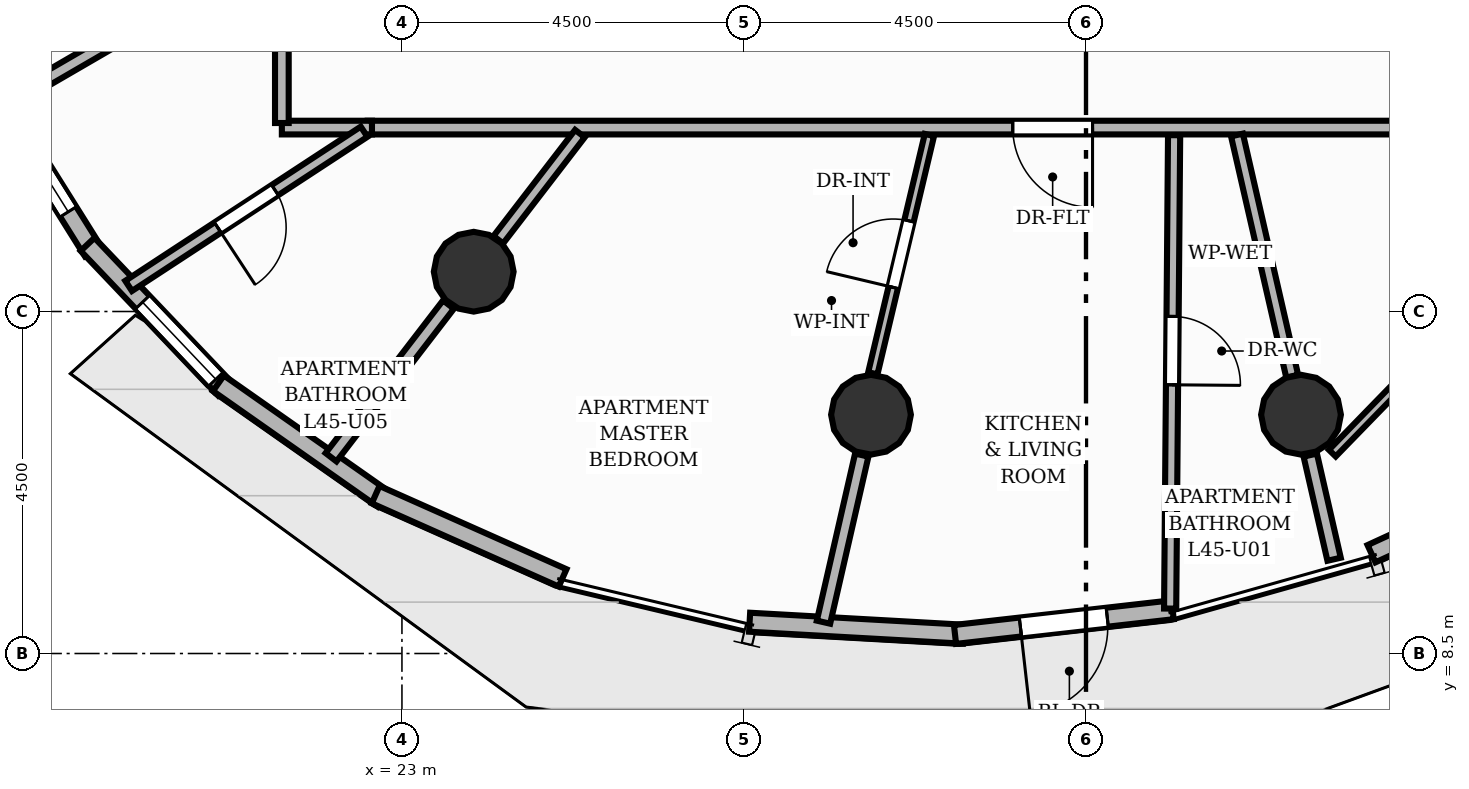
"""IFC4 building model, lengths in metres.
Left out: names, types, materials, properties, quantities, classifications, styles, units other than length and angle.
Written with IfcOpenShell. Run it as: python <this file> out.ifc"""

import sys

from ifc_helpers import new_model, si_unit, direction, frame, frame_2d, origin, origin_2d, place, context, subcontext, project, spatial, rectangle, circle, extrude, element, fill, save


model = new_model("IFC4")
c1 = context("Model", 3, precision=1e-05, world=origin(), true_north=direction((0.0, 1.0)))
c2 = subcontext(c1, "Body", "Model", "MODEL_VIEW")
j1 = project(units=[si_unit("LENGTHUNIT", "METRE"), si_unit("PLANEANGLEUNIT", "RADIAN")], contexts=[c1])
p1 = place(None, origin())
s1 = spatial("IfcSite", under=j1, at=p1, CompositionType="ELEMENT")
p2 = place(p1, origin())
s2 = spatial("IfcBuilding", under=s1, at=p2, CompositionType="ELEMENT")
p3 = place(p2, frame((0.0, 0.0, 152.16)))
s3 = spatial("IfcBuildingStorey", under=s2, at=p3, CompositionType="ELEMENT", Elevation=152.16)
for number, where, z_axis, x_axis in (
    (1, (23.944, 13.523, 0.0), (0.0, 0.0, 1.0), (1.0, 0.0, 0.0)),
    (2, (29.171, 11.642, 0.0), (0.0, 0.0, 1.0), (1.0, 0.0, 0.0)),
    (3, (34.829, 11.642, 0.0), (0.0, 0.0, 1.0), (1.0, 0.0, 0.0)),
):
    element("IfcColumn", number, at=place(p3, frame(where, z_axis=z_axis, x_axis=x_axis)), inside=s3, PredefinedType="COLUMN", context=c2, shape_type="SweptSolid", body=[
        extrude(circle(Radius=0.525, at=origin_2d()), origin(), (0.0, 0.0, 1.0), 3.2),
    ])
p4 = place(p3, frame((18.934, 13.793, 0.0), z_axis=(0.0, 0.0, 1.0), x_axis=(-0.530726374543, 0.847543223302, 0.0)))
e4 = element("IfcWall", 4, at=p4, inside=s3, PredefinedType="SOLIDWALL", context=c2, shape_type="SweptSolid", body=[
    extrude(rectangle(XDim=2.624, YDim=0.25, at=frame_2d((1.312, 0.0))), origin(), (0.0, 0.0, 1.0), 2.96),
])
p5 = place(p4, frame((0.612, 0.0, 0.85)))
e5 = element("IfcOpeningElement", 5, at=p5, cuts=e4, PredefinedType="OPENING", context=c2, shape_type="SweptSolid", body=[
    extrude(rectangle(XDim=1.4, YDim=1.45, at=frame_2d((0.7, 0.725))), frame((0.0, 0.135, 0.0), z_axis=(0.0, -1.0, 0.0), x_axis=(1.0, 0.0, 0.0)), (0.0, 0.0, 1.0), 0.27),
])
p6 = place(p3, frame((20.672, 11.981, 0.0), z_axis=(0.0, 0.0, 1.0), x_axis=(-0.688923042016, 0.724834492957, 0.0)))
e6 = element("IfcWall", 6, at=p6, inside=s3, PredefinedType="SOLIDWALL", context=c2, shape_type="SweptSolid", body=[
    extrude(rectangle(XDim=2.624, YDim=0.25, at=frame_2d((1.312, 0.0))), origin(), (0.0, 0.0, 1.0), 2.96),
])
p7 = place(p6, frame((0.175, 0.0, 0.85)))
e7 = element("IfcOpeningElement", 7, at=p7, cuts=e6, PredefinedType="OPENING", context=c2, shape_type="SweptSolid", body=[
    extrude(rectangle(XDim=1.4, YDim=1.55, at=frame_2d((0.7, 0.775))), frame((0.0, 0.135, 0.0), z_axis=(0.0, -1.0, 0.0), x_axis=(1.0, 0.0, 0.0)), (0.0, 0.0, 1.0), 0.27),
])
p8 = place(p3, frame((22.753, 10.534, 0.0), z_axis=(0.0, 0.0, 1.0), x_axis=(-0.818434239786, 0.574600204617, 0.0)))
e8 = element("IfcWall", 8, at=p8, inside=s3, PredefinedType="SOLIDWALL", context=c2, shape_type="SweptSolid", body=[
    extrude(rectangle(XDim=2.648, YDim=0.25, at=frame_2d((1.324, 0.0))), origin(), (0.0, 0.0, 1.0), 2.96),
])
p9 = place(p3, frame((25.114, 9.495, 0.0), z_axis=(0.0, 0.0, 1.0), x_axis=(-0.913598321014, 0.406617889228, 0.0)))
e9 = element("IfcWall", 9, at=p9, inside=s3, PredefinedType="SOLIDWALL", context=c2, shape_type="SweptSolid", body=[
    extrude(rectangle(XDim=2.693, YDim=0.25, at=frame_2d((1.346, 0.0))), origin(), (0.0, 0.0, 1.0), 2.96),
])
p10 = place(p3, frame((30.387, 8.754, 0.0), z_axis=(0.0, 0.0, 1.0), x_axis=(-0.998436800423, 0.055892356906, 0.0)))
e10 = element("IfcWall", 10, at=p10, inside=s3, PredefinedType="SOLIDWALL", context=c2, shape_type="SweptSolid", body=[
    extrude(rectangle(XDim=2.817, YDim=0.25, at=frame_2d((1.409, 0.0))), origin(), (0.0, 0.0, 1.0), 2.96),
])
p11 = place(p3, frame((33.14, 9.076, 0.0), z_axis=(0.0, 0.0, 1.0), x_axis=(-0.993631150985, -0.112681568111, 0.0)))
e11 = element("IfcWall", 11, at=p11, inside=s3, PredefinedType="SOLIDWALL", context=c2, shape_type="SweptSolid", body=[
    extrude(rectangle(XDim=2.882, YDim=0.25, at=frame_2d((1.441, 0.0))), origin(), (0.0, 0.0, 1.0), 2.96),
])
p12 = place(p11, frame((0.866, 0.0, 0.0)))
e12 = element("IfcOpeningElement", 12, at=p12, cuts=e11, PredefinedType="OPENING", context=c2, shape_type="SweptSolid", body=[
    extrude(rectangle(XDim=1.15, YDim=2.2, at=frame_2d((0.575, 1.1))), frame((0.0, 0.135, 0.0), z_axis=(0.0, -1.0, 0.0), x_axis=(1.0, 0.0, 0.0)), (0.0, 0.0, 1.0), 0.27),
])
p13 = place(p3, frame((38.461, 11.056, 0.0), z_axis=(0.0, 0.0, 1.0), x_axis=(-0.908594420046, -0.417679518124, 0.0)))
e13 = element("IfcWall", 13, at=p13, inside=s3, PredefinedType="SOLIDWALL", context=c2, shape_type="SweptSolid", body=[
    extrude(rectangle(XDim=2.977, YDim=0.25, at=frame_2d((1.489, 0.0))), origin(), (0.0, 0.0, 1.0), 2.96),
])
p14 = place(p13, frame((0.664, 0.0, 0.85)))
e14 = element("IfcOpeningElement", 14, at=p14, cuts=e13, PredefinedType="OPENING", context=c2, shape_type="SweptSolid", body=[
    extrude(rectangle(XDim=1.65, YDim=1.55, at=frame_2d((0.825, 0.775))), frame((0.0, 0.135, 0.0), z_axis=(0.0, -1.0, 0.0), x_axis=(1.0, 0.0, 0.0)), (0.0, 0.0, 1.0), 0.27),
])
p15 = place(p3, frame((19.472, 16.726, 0.0), z_axis=(0.0, 0.0, 1.0), x_axis=(-0.864794183852, -0.502126497584, 0.0)))
e15 = element("IfcWall", 15, at=p15, inside=s3, PredefinedType="PARTITIONING", context=c2, shape_type="SweptSolid", body=[
    extrude(rectangle(XDim=1.959, YDim=0.18, at=frame_2d((0.979, 0.0))), origin(), (0.0, 0.0, 1.0), 2.336),
])
p16 = place(p3, frame((23.612, 13.092, 0.0), z_axis=(0.0, 0.0, 1.0), x_axis=(-0.609529171404, -0.79276364019, 0.0)))
e16 = element("IfcWall", 16, at=p16, inside=s3, PredefinedType="PARTITIONING", context=c2, shape_type="SweptSolid", body=[
    extrude(rectangle(XDim=2.534, YDim=0.18, at=frame_2d((1.267, 0.0))), origin(), (0.0, 0.0, 1.0), 2.336),
])
p17 = place(p3, frame((29.05, 11.111, 0.0), z_axis=(0.0, 0.0, 1.0), x_axis=(-0.223104026265, -0.974794641688, 0.0)))
e17 = element("IfcWall", 17, at=p17, inside=s3, PredefinedType="PARTITIONING", context=c2, shape_type="SweptSolid", body=[
    extrude(rectangle(XDim=2.255, YDim=0.18, at=frame_2d((1.128, 0.0))), origin(), (0.0, 0.0, 1.0), 2.336),
])
p18 = place(p3, frame((34.95, 11.111, 0.0), z_axis=(0.0, 0.0, 1.0), x_axis=(0.223121817242, -0.974790569646, 0.0)))
e18 = element("IfcWall", 18, at=p18, inside=s3, PredefinedType="PARTITIONING", context=c2, shape_type="SweptSolid", body=[
    extrude(rectangle(XDim=1.406, YDim=0.18, at=frame_2d((0.703, 0.0))), origin(), (0.0, 0.0, 1.0), 2.336),
])
p19 = place(p3, frame((39.08, 15.42, 0.0), z_axis=(0.0, 0.0, 1.0), x_axis=(-1.0, 0.0, 0.0)))
e19 = element("IfcWall", 19, at=p19, inside=s3, PredefinedType="PARTITIONING", context=c2, shape_type="SweptSolid", body=[
    extrude(rectangle(XDim=16.531, YDim=0.18, at=frame_2d((8.266, 0.0))), origin(), (0.0, 0.0, 1.0), 2.955),
])
p20 = place(p19, frame((6.994, 0.0, 0.0)))
e20 = element("IfcOpeningElement", 20, at=p20, cuts=e19, PredefinedType="OPENING", context=c2, shape_type="SweptSolid", body=[
    extrude(rectangle(XDim=1.05, YDim=2.15, at=frame_2d((0.525, 1.075))), frame((0.0, 0.1, 0.0), z_axis=(0.0, -1.0, 0.0), x_axis=(1.0, 0.0, 0.0)), (0.0, 0.0, 1.0), 0.2),
])
p21 = place(p3, frame((22.606, 15.42, 0.0), z_axis=(0.0, 0.0, 1.0), x_axis=(-1.0, 0.0, 0.0)))
e21 = element("IfcWall", 21, at=p21, inside=s3, PredefinedType="PARTITIONING", context=c2, shape_type="SweptSolid", body=[
    extrude(rectangle(XDim=1.186, YDim=0.18, at=frame_2d((0.593, 0.0))), origin(), (0.0, 0.0, 1.0), 2.955),
])
p22 = place(p3, frame((21.42, 15.48, 0.0), z_axis=(0.0, 0.0, 1.0), x_axis=(0.0, 1.0, 0.0)))
e22 = element("IfcWall", 22, at=p22, inside=s3, PredefinedType="PARTITIONING", context=c2, shape_type="SweptSolid", body=[
    extrude(rectangle(XDim=6.12, YDim=0.18, at=frame_2d((3.06, 0.0))), origin(), (0.0, 0.0, 1.0), 2.955),
])
p23 = place(p22, frame((2.312, 0.0, 0.0)))
e23 = element("IfcOpeningElement", 23, at=p23, cuts=e22, PredefinedType="OPENING", context=c2, shape_type="SweptSolid", body=[
    extrude(rectangle(XDim=1.05, YDim=2.15, at=frame_2d((0.525, 1.075))), frame((0.0, 0.1, 0.0), z_axis=(0.0, -1.0, 0.0), x_axis=(1.0, 0.0, 0.0)), (0.0, 0.0, 1.0), 0.2),
])
p24 = place(p3, frame((33.159, 15.32, 0.0), z_axis=(0.0, 0.0, 1.0), x_axis=(-0.008387256911, -0.999964826342, 0.0)))
e24 = element("IfcWall", 24, at=p24, inside=s3, PredefinedType="PLUMBINGWALL", context=c2, shape_type="SweptSolid", body=[
    extrude(rectangle(XDim=6.229, YDim=0.16, at=frame_2d((3.115, 0.0))), origin(), (0.0, 0.0, 1.0), 2.955),
])
p25 = place(p24, frame((2.385, 0.0, 0.0)))
e25 = element("IfcOpeningElement", 25, at=p25, cuts=e24, PredefinedType="OPENING", context=c2, shape_type="SweptSolid", body=[
    extrude(rectangle(XDim=0.9, YDim=2.1, at=frame_2d((0.45, 1.05))), frame((0.0, 0.09, 0.0), z_axis=(0.0, -1.0, 0.0), x_axis=(1.0, 0.0, 0.0)), (0.0, 0.0, 1.0), 0.18),
])
p26 = place(p3, frame((29.196, 12.187, 0.0), z_axis=(0.0, 0.0, 1.0), x_axis=(0.230968453673, 0.972961239417, 0.0)))
e26 = element("IfcWall", 26, at=p26, inside=s3, PredefinedType="PARTITIONING", context=c2, shape_type="SweptSolid", body=[
    extrude(rectangle(XDim=3.223, YDim=0.125, at=frame_2d((1.611, 0.0))), origin(), (0.0, 0.0, 1.0), 2.336),
])
p27 = place(p26, frame((1.161, 0.0, 0.0)))
e27 = element("IfcOpeningElement", 27, at=p27, cuts=e26, PredefinedType="OPENING", context=c2, shape_type="SweptSolid", body=[
    extrude(rectangle(XDim=0.9, YDim=2.1, at=frame_2d((0.45, 1.05))), frame((0.0, 0.073, 0.0), z_axis=(0.0, -1.0, 0.0), x_axis=(1.0, 0.0, 0.0)), (0.0, 0.0, 1.0), 0.145),
])
p28 = place(p3, frame((33.986, 15.323, 0.0), z_axis=(0.0, 0.0, 1.0), x_axis=(0.223166862669, -0.97478025801, 0.0)))
e28 = element("IfcWall", 28, at=p28, inside=s3, PredefinedType="PLUMBINGWALL", context=c2, shape_type="SweptSolid", body=[
    extrude(rectangle(XDim=3.256, YDim=0.16, at=frame_2d((1.628, 0.0))), origin(), (0.0, 0.0, 1.0), 2.336),
])
p29 = place(p3, frame((24.268, 13.944, 0.0), z_axis=(0.0, 0.0, 1.0), x_axis=(0.609536601946, 0.792757927042, 0.0)))
e29 = element("IfcWall", 29, at=p29, inside=s3, PredefinedType="PLUMBINGWALL", context=c2, shape_type="SweptSolid", body=[
    extrude(rectangle(XDim=1.761, YDim=0.16, at=frame_2d((0.881, 0.0))), origin(), (0.0, 0.0, 1.0), 2.336),
])
p30 = place(p3, frame((44.336, 20.497, 0.0), z_axis=(0.0, 0.0, 1.0), x_axis=(-0.696857448942, -0.717209659621, 0.0)))
e30 = element("IfcWall", 30, at=p30, inside=s3, PredefinedType="PARTITIONING", context=c2, shape_type="SweptSolid", body=[
    extrude(rectangle(XDim=13.052, YDim=0.125, at=frame_2d((6.526, 0.0))), origin(), (0.0, 0.0, 1.0), 2.411),
])
p31 = place(p30, frame((5.516, 0.0, 0.0)))
e31 = element("IfcOpeningElement", 31, at=p31, cuts=e30, PredefinedType="OPENING", context=c2, shape_type="SweptSolid", body=[
    extrude(rectangle(XDim=0.9, YDim=2.1, at=frame_2d((0.45, 1.05))), frame((0.0, 0.073, 0.0), z_axis=(0.0, -1.0, 0.0), x_axis=(1.0, 0.0, 0.0)), (0.0, 0.0, 1.0), 0.145),
])
p32 = place(p3, frame((22.502, 15.365, 0.0), z_axis=(0.0, 0.0, 1.0), x_axis=(-0.836626802071, -0.547773305352, 0.0)))
e32 = element("IfcWall", 32, at=p32, inside=s3, PredefinedType="PLUMBINGWALL", context=c2, shape_type="SweptSolid", body=[
    extrude(rectangle(XDim=3.703, YDim=0.16, at=frame_2d((1.852, 0.0))), origin(), (0.0, 0.0, 1.0), 2.955),
])
p33 = place(p32, frame((1.401, 0.0, 0.0)))
e33 = element("IfcOpeningElement", 33, at=p33, cuts=e32, PredefinedType="OPENING", context=c2, shape_type="SweptSolid", body=[
    extrude(rectangle(XDim=0.9, YDim=2.1, at=frame_2d((0.45, 1.05))), frame((0.0, 0.09, 0.0), z_axis=(0.0, -1.0, 0.0), x_axis=(1.0, 0.0, 0.0)), (0.0, 0.0, 1.0), 0.18),
])
p34 = place(p12, origin())
e34 = element("IfcDoor", 34, at=p34, inside=s3, OperationType="SINGLE_SWING_RIGHT", PredefinedType="DOOR", context=c2, shape_type="SweptSolid", body=[
    extrude(rectangle(XDim=1.15, YDim=2.2, at=frame_2d((0.575, 1.1))), frame((0.0, 0.025, 0.0), z_axis=(0.0, -1.0, 0.0), x_axis=(1.0, 0.0, 0.0)), (0.0, 0.0, 1.0), 0.05),
])
fill(e12, e34)
p35 = place(p5, origin())
e35 = element("IfcWindow", 35, at=p35, inside=s3, PartitioningType="SINGLE_PANEL", PredefinedType="WINDOW", context=c2, shape_type="SweptSolid", body=[
    extrude(rectangle(XDim=1.4, YDim=1.45, at=frame_2d((0.7, 0.725))), frame((0.0, 0.03, 0.0), z_axis=(0.0, -1.0, 0.0), x_axis=(1.0, 0.0, 0.0)), (0.0, 0.0, 1.0), 0.06),
])
fill(e5, e35)
p36 = place(p7, origin())
e36 = element("IfcWindow", 36, at=p36, inside=s3, PartitioningType="SINGLE_PANEL", PredefinedType="WINDOW", context=c2, shape_type="SweptSolid", body=[
    extrude(rectangle(XDim=1.4, YDim=1.55, at=frame_2d((0.7, 0.775))), frame((0.0, 0.03, 0.0), z_axis=(0.0, -1.0, 0.0), x_axis=(1.0, 0.0, 0.0)), (0.0, 0.0, 1.0), 0.06),
])
fill(e7, e36)
p37 = place(p20, origin())
e37 = element("IfcDoor", 37, at=p37, inside=s3, OperationType="SINGLE_SWING_LEFT", PredefinedType="DOOR", context=c2, shape_type="SweptSolid", body=[
    extrude(rectangle(XDim=1.05, YDim=2.15, at=frame_2d((0.525, 1.075))), frame((0.0, 0.025, 0.0), z_axis=(0.0, -1.0, 0.0), x_axis=(1.0, 0.0, 0.0)), (0.0, 0.0, 1.0), 0.05),
])
fill(e20, e37)
p38 = place(p25, origin())
e38 = element("IfcDoor", 38, at=p38, inside=s3, OperationType="SINGLE_SWING_RIGHT", PredefinedType="DOOR", context=c2, shape_type="SweptSolid", body=[
    extrude(rectangle(XDim=0.9, YDim=2.1, at=frame_2d((0.45, 1.05))), frame((0.0, 0.025, 0.0), z_axis=(0.0, -1.0, 0.0), x_axis=(1.0, 0.0, 0.0)), (0.0, 0.0, 1.0), 0.05),
])
fill(e25, e38)
p39 = place(p27, origin())
e39 = element("IfcDoor", 39, at=p39, inside=s3, OperationType="SINGLE_SWING_LEFT", PredefinedType="DOOR", context=c2, shape_type="SweptSolid", body=[
    extrude(rectangle(XDim=0.9, YDim=2.1, at=frame_2d((0.45, 1.05))), frame((0.0, 0.025, 0.0), z_axis=(0.0, -1.0, 0.0), x_axis=(1.0, 0.0, 0.0)), (0.0, 0.0, 1.0), 0.05),
])
fill(e27, e39)
p40 = place(p33, origin())
e40 = element("IfcDoor", 40, at=p40, inside=s3, OperationType="SINGLE_SWING_RIGHT", PredefinedType="DOOR", context=c2, shape_type="SweptSolid", body=[
    extrude(rectangle(XDim=0.9, YDim=2.1, at=frame_2d((0.45, 1.05))), frame((0.0, 0.025, 0.0), z_axis=(0.0, -1.0, 0.0), x_axis=(1.0, 0.0, 0.0)), (0.0, 0.0, 1.0), 0.05),
])
fill(e33, e40)
save(model, sys.argv[1])
